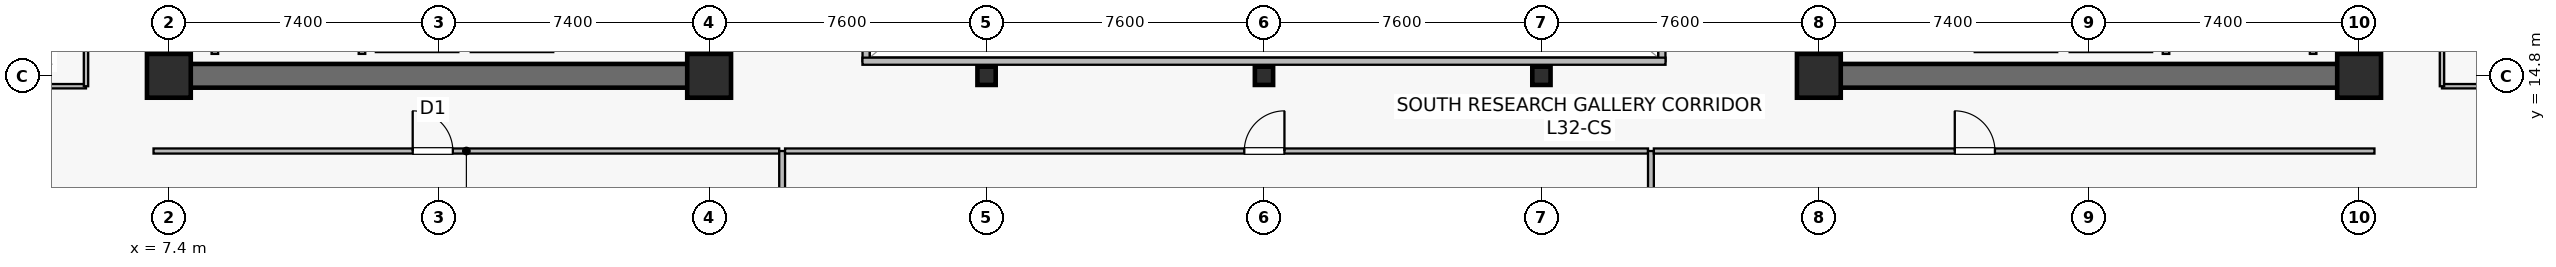
"""IFC4 building model, lengths in metres.
Left out: names, types, materials, properties, quantities, classifications, styles, units other than length and angle.
Written with IfcOpenShell. Run it as: python <this file> out.ifc"""

import sys

from ifc_helpers import new_model, si_unit, direction, frame, frame_2d, origin, origin_2d, place, context, subcontext, project, spatial, rectangle, hollow_rectangle, extrude, source, transform, mapped, element, fill, save


model = new_model("IFC4")
c1 = context("Model", 3, precision=1e-05, world=origin(), true_north=direction((0.0, 1.0)))
c2 = subcontext(c1, "Body", "Model", "MODEL_VIEW")
j1 = project(units=[si_unit("LENGTHUNIT", "METRE"), si_unit("PLANEANGLEUNIT", "RADIAN")], contexts=[c1])
p1 = place(None, origin())
s1 = spatial("IfcSite", under=j1, at=p1, CompositionType="ELEMENT")
p2 = place(p1, origin())
s2 = spatial("IfcBuilding", under=s1, at=p2, CompositionType="ELEMENT")
p3 = place(p2, frame((0.0, 0.0, 133.8)))
s3 = spatial("IfcBuildingStorey", under=s2, at=p3, CompositionType="ELEMENT", Elevation=133.8)
p4 = place(p3, frame((7.075, 14.8, 0.0), z_axis=(0.0, 0.0, 1.0), x_axis=(1.0, 0.0, 0.0)))
e1 = element("IfcWall", 1, at=p4, inside=s3, PredefinedType="SHEAR", context=c2, shape_type="SweptSolid", body=[
    extrude(rectangle(XDim=15.45, YDim=0.65, at=frame_2d((7.725, 0.0))), origin(), (0.0, 0.0, 1.0), 3.79),
])
p5 = place(p3, frame((7.4, 15.125, 0.0), z_axis=(0.0, 0.0, 1.0), x_axis=(0.0, 1.0, 0.0)))
e2 = element("IfcWall", 2, at=p5, inside=s3, PredefinedType="SHEAR", context=c2, shape_type="SweptSolid", body=[
    extrude(rectangle(XDim=18.35, YDim=0.65, at=frame_2d((9.175, 0.0))), origin(), (0.0, 0.0, 1.0), 3.79),
])
p6 = place(p3, frame((22.2, 15.125, 0.0), z_axis=(0.0, 0.0, 1.0), x_axis=(0.0, 1.0, 0.0)))
e3 = element("IfcWall", 3, at=p6, inside=s3, PredefinedType="SHEAR", context=c2, shape_type="SweptSolid", body=[
    extrude(rectangle(XDim=18.35, YDim=0.65, at=frame_2d((9.175, 0.0))), origin(), (0.0, 0.0, 1.0), 3.79),
])
p7 = place(p6, frame((3.425, 0.0, 0.0)))
e4 = element("IfcOpeningElement", 4, at=p7, cuts=e3, PredefinedType="OPENING", context=c2, shape_type="SweptSolid", body=[
    extrude(rectangle(XDim=1.42, YDim=2.2, at=frame_2d((0.71, 1.1))), frame((0.0, 0.335, 0.0), z_axis=(0.0, -1.0, 0.0), x_axis=(1.0, 0.0, 0.0)), (0.0, 0.0, 1.0), 0.67),
])
p8 = place(p3, frame((52.275, 14.8, 0.0), z_axis=(0.0, 0.0, 1.0), x_axis=(1.0, 0.0, 0.0)))
e5 = element("IfcWall", 5, at=p8, inside=s3, PredefinedType="SHEAR", context=c2, shape_type="SweptSolid", body=[
    extrude(rectangle(XDim=15.45, YDim=0.65, at=frame_2d((7.725, 0.0))), origin(), (0.0, 0.0, 1.0), 3.79),
])
p9 = place(p3, frame((52.6, 15.125, 0.0), z_axis=(0.0, 0.0, 1.0), x_axis=(0.0, 1.0, 0.0)))
e6 = element("IfcWall", 6, at=p9, inside=s3, PredefinedType="SHEAR", context=c2, shape_type="SweptSolid", body=[
    extrude(rectangle(XDim=18.35, YDim=0.65, at=frame_2d((9.175, 0.0))), origin(), (0.0, 0.0, 1.0), 3.79),
])
p10 = place(p9, frame((3.425, 0.0, 0.0)))
e7 = element("IfcOpeningElement", 7, at=p10, cuts=e6, PredefinedType="OPENING", context=c2, shape_type="SweptSolid", body=[
    extrude(rectangle(XDim=1.42, YDim=2.2, at=frame_2d((0.71, 1.1))), frame((0.0, 0.335, 0.0), z_axis=(0.0, -1.0, 0.0), x_axis=(1.0, 0.0, 0.0)), (0.0, 0.0, 1.0), 0.67),
])
p11 = place(p3, frame((67.4, 15.125, 0.0), z_axis=(0.0, 0.0, 1.0), x_axis=(0.0, 1.0, 0.0)))
e8 = element("IfcWall", 8, at=p11, inside=s3, PredefinedType="SHEAR", context=c2, shape_type="SweptSolid", body=[
    extrude(rectangle(XDim=18.35, YDim=0.65, at=frame_2d((9.175, 0.0))), origin(), (0.0, 0.0, 1.0), 3.79),
])
m1 = source(origin(), c2, "Body", "SweptSolid", [
    extrude(rectangle(XDim=1.2, YDim=1.2, at=origin_2d()), origin(), (0.0, 0.0, 1.0), 4.1),
])
for number, where, z_axis, x_axis in (
    (9, (7.4, 14.8, 0.0), (0.0, 0.0, 1.0), (1.0, 0.0, 0.0)),
    (10, (22.2, 14.8, 0.0), (0.0, 0.0, 1.0), (1.0, 0.0, 0.0)),
    (11, (52.6, 14.8, 0.0), (0.0, 0.0, 1.0), (1.0, 0.0, 0.0)),
    (12, (67.4, 14.8, 0.0), (0.0, 0.0, 1.0), (1.0, 0.0, 0.0)),
):
    element("IfcColumn", number, at=place(p3, frame(where, z_axis=z_axis, x_axis=x_axis)), inside=s3, PredefinedType="COLUMN", context=c2, shape_type="MappedRepresentation", body=[
        mapped(m1, transform((0.0, 0.0, 0.0), scale=1.0)),
    ])
m2 = source(origin(), c2, "Body", "SweptSolid", [
    extrude(hollow_rectangle(XDim=0.5, YDim=0.5, WallThickness=0.022, at=origin_2d()), origin(), (0.0, 0.0, 1.0), 4.1),
])
for number, where, z_axis, x_axis in (
    (13, (29.8, 14.8, 0.0), (0.0, 0.0, 1.0), (1.0, 0.0, 0.0)),
    (14, (37.4, 14.8, 0.0), (0.0, 0.0, 1.0), (1.0, 0.0, 0.0)),
    (15, (45.0, 14.8, 0.0), (0.0, 0.0, 1.0), (1.0, 0.0, 0.0)),
):
    element("IfcColumn", number, at=place(p3, frame(where, z_axis=z_axis, x_axis=x_axis)), inside=s3, PredefinedType="COLUMN", context=c2, shape_type="MappedRepresentation", body=[
        mapped(m2, transform((0.0, 0.0, 0.0), scale=1.0)),
    ])
p12 = place(p3, frame((13.07, 15.55, 0.0), z_axis=(0.0, 0.0, 1.0), x_axis=(1.0, 0.0, 0.0)))
e16 = element("IfcWall", 16, at=p12, inside=s3, PredefinedType="SOLIDWALL", context=c2, shape_type="SweptSolid", body=[
    extrude(rectangle(XDim=2.26, YDim=0.2, at=frame_2d((1.13, 0.0))), origin(), (0.0, 0.0, 1.0), 3.125),
])
p13 = place(p3, frame((15.67, 15.55, 0.0), z_axis=(0.0, 0.0, 1.0), x_axis=(1.0, 0.0, 0.0)))
e17 = element("IfcWall", 17, at=p13, inside=s3, PredefinedType="SOLIDWALL", context=c2, shape_type="SweptSolid", body=[
    extrude(rectangle(XDim=2.26, YDim=0.2, at=frame_2d((1.13, 0.0))), origin(), (0.0, 0.0, 1.0), 3.79),
])
for number, where, z_axis, x_axis in (
    (18, (12.69, 15.4, 0.0), (0.0, 0.0, 1.0), (0.0, 1.0, 0.0)),
    (19, (8.66, 15.4, 0.0), (0.0, 0.0, 1.0), (0.0, 1.0, 0.0)),
):
    element("IfcWall", number, at=place(p3, frame(where, z_axis=z_axis, x_axis=x_axis)), inside=s3, PredefinedType="SOLIDWALL", context=c2, shape_type="SweptSolid", body=[
        extrude(rectangle(XDim=2.4, YDim=0.18, at=frame_2d((1.2, 0.0))), origin(), (0.0, 0.0, 1.0), 3.79),
    ])
p14 = place(p3, frame((59.47, 15.55, 0.0), z_axis=(0.0, 0.0, 1.0), x_axis=(1.0, 0.0, 0.0)))
e20 = element("IfcWall", 20, at=p14, inside=s3, PredefinedType="SOLIDWALL", context=c2, shape_type="SweptSolid", body=[
    extrude(rectangle(XDim=2.26, YDim=0.2, at=frame_2d((1.13, 0.0))), origin(), (0.0, 0.0, 1.0), 3.125),
])
p15 = place(p3, frame((56.87, 15.55, 0.0), z_axis=(0.0, 0.0, 1.0), x_axis=(1.0, 0.0, 0.0)))
e21 = element("IfcWall", 21, at=p15, inside=s3, PredefinedType="SOLIDWALL", context=c2, shape_type="SweptSolid", body=[
    extrude(rectangle(XDim=2.26, YDim=0.2, at=frame_2d((1.13, 0.0))), origin(), (0.0, 0.0, 1.0), 3.79),
])
for number, where, z_axis, x_axis in (
    (22, (62.11, 15.4, 0.0), (0.0, 0.0, 1.0), (0.0, 1.0, 0.0)),
    (23, (66.14, 15.4, 0.0), (0.0, 0.0, 1.0), (0.0, 1.0, 0.0)),
):
    element("IfcWall", number, at=place(p3, frame(where, z_axis=z_axis, x_axis=x_axis)), inside=s3, PredefinedType="SOLIDWALL", context=c2, shape_type="SweptSolid", body=[
        extrude(rectangle(XDim=2.4, YDim=0.18, at=frame_2d((1.2, 0.0))), origin(), (0.0, 0.0, 1.0), 3.79),
    ])
p16 = place(p3, frame((26.5, 15.2, 0.0), z_axis=(0.0, 0.0, 1.0), x_axis=(0.0, 1.0, 0.0)))
e24 = element("IfcWall", 24, at=p16, inside=s3, PredefinedType="SOLIDWALL", context=c2, shape_type="SweptSolid", body=[
    extrude(rectangle(XDim=18.2, YDim=0.195, at=frame_2d((9.1, 0.0))), origin(), (0.0, 0.0, 1.0), 3.79),
])
p17 = place(p16, frame((1.8, 0.0, 0.9)))
e25 = element("IfcOpeningElement", 25, at=p17, cuts=e24, PredefinedType="OPENING", context=c2, shape_type="SweptSolid", body=[
    extrude(rectangle(XDim=1.5, YDim=1.4, at=frame_2d((0.75, 0.7))), frame((0.0, 0.107, 0.0), z_axis=(0.0, -1.0, 0.0), x_axis=(1.0, 0.0, 0.0)), (0.0, 0.0, 1.0), 0.215),
])
p18 = place(p16, frame((13.2, 0.0, 0.9)))
e26 = element("IfcOpeningElement", 26, at=p18, cuts=e24, PredefinedType="OPENING", context=c2, shape_type="SweptSolid", body=[
    extrude(rectangle(XDim=1.5, YDim=1.4, at=frame_2d((0.75, 0.7))), frame((0.0, 0.107, 0.0), z_axis=(0.0, -1.0, 0.0), x_axis=(1.0, 0.0, 0.0)), (0.0, 0.0, 1.0), 0.215),
])
p19 = place(p3, frame((48.3, 15.2, 0.0), z_axis=(0.0, 0.0, 1.0), x_axis=(0.0, 1.0, 0.0)))
e27 = element("IfcWall", 27, at=p19, inside=s3, PredefinedType="SOLIDWALL", context=c2, shape_type="SweptSolid", body=[
    extrude(rectangle(XDim=18.2, YDim=0.195, at=frame_2d((9.1, 0.0))), origin(), (0.0, 0.0, 1.0), 3.79),
])
p20 = place(p19, frame((1.8, 0.0, 0.9)))
e28 = element("IfcOpeningElement", 28, at=p20, cuts=e27, PredefinedType="OPENING", context=c2, shape_type="SweptSolid", body=[
    extrude(rectangle(XDim=1.5, YDim=1.4, at=frame_2d((0.75, 0.7))), frame((0.0, 0.107, 0.0), z_axis=(0.0, -1.0, 0.0), x_axis=(1.0, 0.0, 0.0)), (0.0, 0.0, 1.0), 0.215),
])
p21 = place(p19, frame((13.2, 0.0, 0.9)))
e29 = element("IfcOpeningElement", 29, at=p21, cuts=e27, PredefinedType="OPENING", context=c2, shape_type="SweptSolid", body=[
    extrude(rectangle(XDim=1.5, YDim=1.4, at=frame_2d((0.75, 0.7))), frame((0.0, 0.107, 0.0), z_axis=(0.0, -1.0, 0.0), x_axis=(1.0, 0.0, 0.0)), (0.0, 0.0, 1.0), 0.215),
])
p22 = place(p3, frame((26.4, 15.2, 0.0), z_axis=(0.0, 0.0, 1.0), x_axis=(1.0, 0.0, 0.0)))
e30 = element("IfcWall", 30, at=p22, inside=s3, PredefinedType="SOLIDWALL", context=c2, shape_type="SweptSolid", body=[
    extrude(rectangle(XDim=22.0, YDim=0.195, at=frame_2d((11.0, 0.0))), origin(), (0.0, 0.0, 1.0), 3.79),
])
p23 = place(p3, frame((6.98, 12.74, 0.0), z_axis=(0.0, 0.0, 1.0), x_axis=(1.0, 0.0, 0.0)))
e31 = element("IfcWall", 31, at=p23, inside=s3, PredefinedType="PARTITIONING", context=c2, shape_type="SweptSolid", body=[
    extrude(rectangle(XDim=17.14, YDim=0.14, at=frame_2d((8.57, 0.0))), origin(), (0.0, 0.0, 1.0), 3.125),
])
p24 = place(p23, frame((7.1, 0.0, 0.0)))
e32 = element("IfcOpeningElement", 32, at=p24, cuts=e31, PredefinedType="OPENING", context=c2, shape_type="SweptSolid", body=[
    extrude(rectangle(XDim=1.1, YDim=2.18, at=frame_2d((0.55, 1.09))), frame((0.0, 0.08, 0.0), z_axis=(0.0, -1.0, 0.0), x_axis=(1.0, 0.0, 0.0)), (0.0, 0.0, 1.0), 0.16),
])
p25 = place(p3, frame((24.2, 1.41, 0.0), z_axis=(0.0, 0.0, 1.0), x_axis=(0.0, 1.0, 0.0)))
e33 = element("IfcWall", 33, at=p25, inside=s3, PredefinedType="PARTITIONING", context=c2, shape_type="SweptSolid", body=[
    extrude(rectangle(XDim=11.33, YDim=0.16, at=frame_2d((5.665, 0.0))), origin(), (0.0, 0.0, 1.0), 3.075),
])
p26 = place(p3, frame((24.28, 12.74, 0.0), z_axis=(0.0, 0.0, 1.0), x_axis=(1.0, 0.0, 0.0)))
e34 = element("IfcWall", 34, at=p26, inside=s3, PredefinedType="PARTITIONING", context=c2, shape_type="SweptSolid", body=[
    extrude(rectangle(XDim=23.64, YDim=0.14, at=frame_2d((11.82, 0.0))), origin(), (0.0, 0.0, 1.0), 3.125),
])
p27 = place(p26, frame((12.58, 0.0, 0.0)))
e35 = element("IfcOpeningElement", 35, at=p27, cuts=e34, PredefinedType="OPENING", context=c2, shape_type="SweptSolid", body=[
    extrude(rectangle(XDim=1.1, YDim=2.18, at=frame_2d((0.55, 1.09))), frame((0.0, 0.08, 0.0), z_axis=(0.0, -1.0, 0.0), x_axis=(1.0, 0.0, 0.0)), (0.0, 0.0, 1.0), 0.16),
])
p28 = place(p3, frame((48.0, 2.61, 0.0), z_axis=(0.0, 0.0, 1.0), x_axis=(0.0, 1.0, 0.0)))
e36 = element("IfcWall", 36, at=p28, inside=s3, PredefinedType="PARTITIONING", context=c2, shape_type="SweptSolid", body=[
    extrude(rectangle(XDim=10.13, YDim=0.16, at=frame_2d((5.065, 0.0))), origin(), (0.0, 0.0, 1.0), 3.075),
])
p29 = place(p3, frame((48.08, 12.74, 0.0), z_axis=(0.0, 0.0, 1.0), x_axis=(1.0, 0.0, 0.0)))
e37 = element("IfcWall", 37, at=p29, inside=s3, PredefinedType="PARTITIONING", context=c2, shape_type="SweptSolid", body=[
    extrude(rectangle(XDim=19.74, YDim=0.14, at=frame_2d((9.87, 0.0))), origin(), (0.0, 0.0, 1.0), 3.125),
])
p30 = place(p29, frame((8.244, 0.0, 0.0)))
e38 = element("IfcOpeningElement", 38, at=p30, cuts=e37, PredefinedType="OPENING", context=c2, shape_type="SweptSolid", body=[
    extrude(rectangle(XDim=1.1, YDim=2.18, at=frame_2d((0.55, 1.09))), frame((0.0, 0.08, 0.0), z_axis=(0.0, -1.0, 0.0), x_axis=(1.0, 0.0, 0.0)), (0.0, 0.0, 1.0), 0.16),
])
p31 = place(p3, frame((2.11, 14.515, 0.0), z_axis=(0.0, 0.0, 1.0), x_axis=(1.0, 0.0, 0.0)))
e39 = element("IfcWall", 39, at=p31, inside=s3, PredefinedType="PARTITIONING", context=c2, shape_type="SweptSolid", body=[
    extrude(rectangle(XDim=3.02, YDim=0.12, at=frame_2d((1.51, 0.0))), origin(), (0.0, 0.0, 1.0), 3.79),
])
p32 = place(p3, frame((5.13, 14.515, 0.0), z_axis=(0.0, 0.0, 1.0), x_axis=(0.0, 1.0, 0.0)))
e40 = element("IfcWall", 40, at=p32, inside=s3, PredefinedType="PARTITIONING", context=c2, shape_type="SweptSolid", body=[
    extrude(rectangle(XDim=5.025, YDim=0.12, at=frame_2d((2.513, 0.0))), origin(), (0.0, 0.0, 1.0), 3.79),
])
p33 = place(p32, frame((2.062, 0.0, 0.0)))
e41 = element("IfcOpeningElement", 41, at=p33, cuts=e40, PredefinedType="OPENING", context=c2, shape_type="SweptSolid", body=[
    extrude(rectangle(XDim=0.9, YDim=2.1, at=frame_2d((0.45, 1.05))), frame((0.0, 0.07, 0.0), z_axis=(0.0, -1.0, 0.0), x_axis=(1.0, 0.0, 0.0)), (0.0, 0.0, 1.0), 0.14),
])
p34 = place(p3, frame((69.67, 14.515, 0.0), z_axis=(0.0, 0.0, 1.0), x_axis=(1.0, 0.0, 0.0)))
e42 = element("IfcWall", 42, at=p34, inside=s3, PredefinedType="PARTITIONING", context=c2, shape_type="SweptSolid", body=[
    extrude(rectangle(XDim=3.02, YDim=0.12, at=frame_2d((1.51, 0.0))), origin(), (0.0, 0.0, 1.0), 3.79),
])
p35 = place(p3, frame((69.67, 14.515, 0.0), z_axis=(0.0, 0.0, 1.0), x_axis=(0.0, 1.0, 0.0)))
e43 = element("IfcWall", 43, at=p35, inside=s3, PredefinedType="PARTITIONING", context=c2, shape_type="SweptSolid", body=[
    extrude(rectangle(XDim=9.225, YDim=0.12, at=frame_2d((4.613, 0.0))), origin(), (0.0, 0.0, 1.0), 3.79),
])
p36 = place(p35, frame((4.163, 0.0, 0.0)))
e44 = element("IfcOpeningElement", 44, at=p36, cuts=e43, PredefinedType="OPENING", context=c2, shape_type="SweptSolid", body=[
    extrude(rectangle(XDim=0.9, YDim=2.1, at=frame_2d((0.45, 1.05))), frame((0.0, 0.07, 0.0), z_axis=(0.0, -1.0, 0.0), x_axis=(1.0, 0.0, 0.0)), (0.0, 0.0, 1.0), 0.14),
])
m3 = source(origin(), c2, "Body", "SweptSolid", [
    extrude(rectangle(XDim=1.1, YDim=2.18, at=frame_2d((0.55, 1.09))), frame((0.0, 0.025, 0.0), z_axis=(0.0, -1.0, 0.0), x_axis=(1.0, 0.0, 0.0)), (0.0, 0.0, 1.0), 0.05),
])
p37 = place(p24, origin())
e45 = element("IfcDoor", 45, at=p37, inside=s3, OperationType="SINGLE_SWING_LEFT", PredefinedType="DOOR", context=c2, shape_type="MappedRepresentation", body=[
    mapped(m3, transform((0.0, 0.0, 0.0), scale=1.0)),
])
fill(e32, e45)
p38 = place(p27, origin())
e46 = element("IfcDoor", 46, at=p38, inside=s3, OperationType="SINGLE_SWING_RIGHT", PredefinedType="DOOR", context=c2, shape_type="MappedRepresentation", body=[
    mapped(m3, transform((0.0, 0.0, 0.0), scale=1.0)),
])
fill(e35, e46)
p39 = place(p30, origin())
e47 = element("IfcDoor", 47, at=p39, inside=s3, OperationType="SINGLE_SWING_LEFT", PredefinedType="DOOR", context=c2, shape_type="MappedRepresentation", body=[
    mapped(m3, transform((0.0, 0.0, 0.0), scale=1.0)),
])
fill(e38, e47)
save(model, sys.argv[1])
